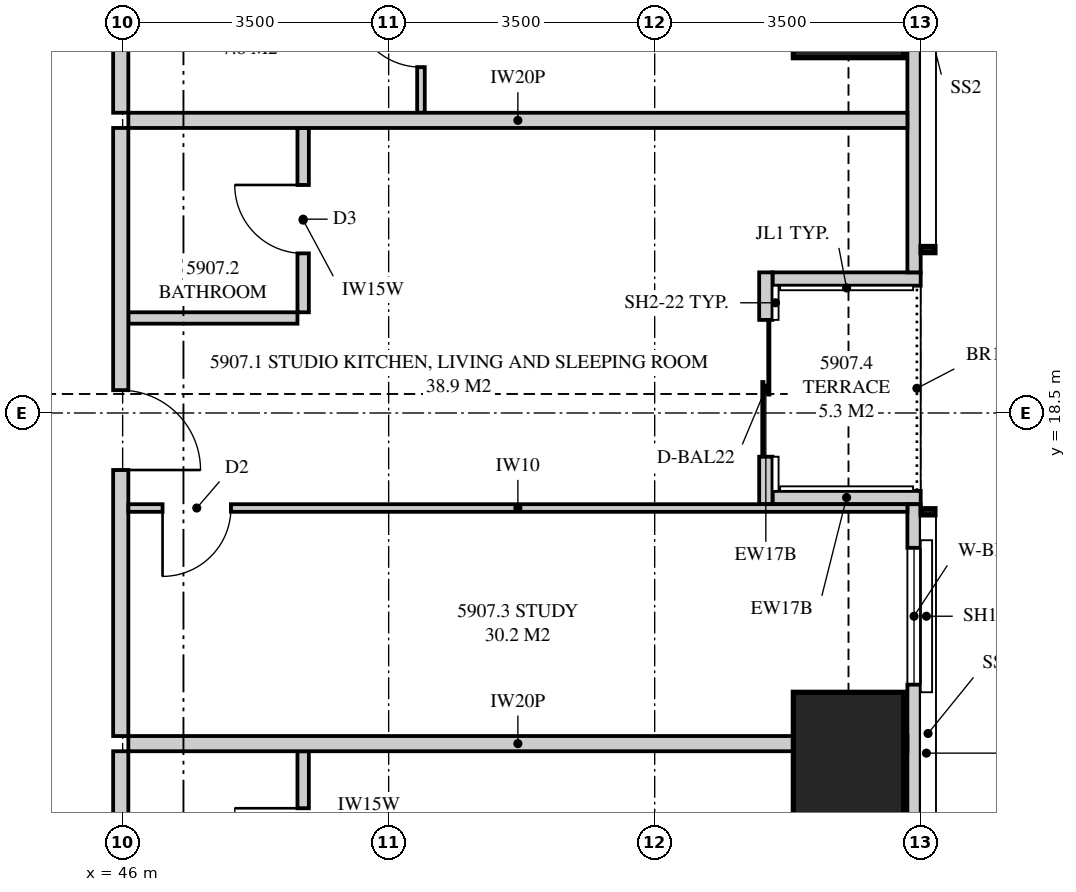
"""IFC4 building model, lengths in metres.
Left out: names, types, materials, properties, quantities, classifications, styles, units other than length and angle.
Written with IfcOpenShell. Run it as: python <this file> out.ifc"""

import sys

from ifc_helpers import new_model, si_unit, direction, frame, frame_2d, origin, origin_2d, place, context, subcontext, project, spatial, polyline, rectangle, outline, extrude, element, fill, save


model = new_model("IFC4")
c1 = context("Model", 3, precision=1e-05, world=origin(), true_north=direction((0.0, 1.0)))
c2 = subcontext(c1, "Body", "Model", "MODEL_VIEW")
j1 = project(units=[si_unit("LENGTHUNIT", "METRE"), si_unit("PLANEANGLEUNIT", "RADIAN")], contexts=[c1])
p1 = place(None, origin())
s1 = spatial("IfcSite", under=j1, at=p1, CompositionType="ELEMENT")
p2 = place(p1, origin())
s2 = spatial("IfcBuilding", under=s1, at=p2, CompositionType="ELEMENT")
p3 = place(p2, frame((0.0, 0.0, 217.95)))
s3 = spatial("IfcBuildingStorey", under=s2, at=p3, CompositionType="ELEMENT", Elevation=217.95)
for number, where, z_axis, x_axis in (
    (1, (55.55, 13.0, 0.0), (0.0, 0.0, 1.0), (1.0, 0.0, 0.0)),
    (2, (55.55, 25.0, 0.0), (0.0, 0.0, 1.0), (1.0, 0.0, 0.0)),
):
    element("IfcColumn", number, at=place(p3, frame(where, z_axis=z_axis, x_axis=x_axis)), inside=s3, PredefinedType="COLUMN", context=c2, shape_type="SweptSolid", body=[
        extrude(rectangle(XDim=1.45, YDim=3.65, at=origin_2d()), origin(), (0.0, 0.0, 1.0), 3.5),
    ])
p4 = place(p3, frame((56.413, 3.051, 0.0), z_axis=(0.0, 0.0, 1.0), x_axis=(0.0, 1.0, 0.0)))
e3 = element("IfcWall", 3, at=p4, inside=s3, PredefinedType="SOLIDWALL", context=c2, shape_type="SweptSolid", body=[
    extrude(outline(polyline([(0.0, 0.0), (14.249, 0.0), (14.249, 2.3), (9.949, 2.3), (9.949, 3.26), (9.858, 3.26), (9.858, 2.3), (9.688, 2.3), (9.688, 3.26), (0.0, 3.26), (0.0, 0.0)])), frame((0.0, 0.087, 0.0), z_axis=(0.0, -1.0, 0.0), x_axis=(1.0, 0.0, 0.0)), (0.0, 0.0, 1.0), 0.175),
])
p5 = place(p4, frame((1.487, 0.0, 0.4)))
e4 = element("IfcOpeningElement", 4, at=p5, cuts=e3, PredefinedType="OPENING", context=c2, shape_type="SweptSolid", body=[
    extrude(rectangle(XDim=1.8, YDim=1.85, at=frame_2d((0.9, 0.925))), frame((0.0, 0.097, 0.0), z_axis=(0.0, -1.0, 0.0), x_axis=(1.0, 0.0, 0.0)), (0.0, 0.0, 1.0), 0.195),
])
p6 = place(p4, frame((5.616, 0.0, 0.4)))
e5 = element("IfcOpeningElement", 5, at=p6, cuts=e3, PredefinedType="OPENING", context=c2, shape_type="SweptSolid", body=[
    extrude(rectangle(XDim=2.4, YDim=1.85, at=frame_2d((1.2, 0.925))), frame((0.0, 0.097, 0.0), z_axis=(0.0, -1.0, 0.0), x_axis=(1.0, 0.0, 0.0)), (0.0, 0.0, 1.0), 0.195),
])
p7 = place(p4, frame((11.875, 0.0, 0.4)))
e6 = element("IfcOpeningElement", 6, at=p7, cuts=e3, PredefinedType="OPENING", context=c2, shape_type="SweptSolid", body=[
    extrude(rectangle(XDim=1.8, YDim=1.85, at=frame_2d((0.9, 0.925))), frame((0.0, 0.097, 0.0), z_axis=(0.0, -1.0, 0.0), x_axis=(1.0, 0.0, 0.0)), (0.0, 0.0, 1.0), 0.195),
])
p8 = place(p3, frame((56.413, 20.35, 0.0), z_axis=(0.0, 0.0, 1.0), x_axis=(0.0, 1.0, 0.0)))
e7 = element("IfcWall", 7, at=p8, inside=s3, PredefinedType="SOLIDWALL", context=c2, shape_type="SweptSolid", body=[
    extrude(outline(polyline([(0.0, 0.0), (10.599, 0.0), (10.599, 3.26), (4.858, 3.26), (4.858, 2.3), (4.793, 2.3), (4.793, 3.26), (4.65, 3.26), (4.65, 2.3), (0.0, 2.3), (0.0, 0.0)])), frame((0.0, 0.087, 0.0), z_axis=(0.0, -1.0, 0.0), x_axis=(1.0, 0.0, 0.0)), (0.0, 0.0, 1.0), 0.175),
])
p9 = place(p8, frame((6.575, 0.0, 0.4)))
e8 = element("IfcOpeningElement", 8, at=p9, cuts=e7, PredefinedType="OPENING", context=c2, shape_type="SweptSolid", body=[
    extrude(rectangle(XDim=1.8, YDim=1.85, at=frame_2d((0.9, 0.925))), frame((0.0, 0.097, 0.0), z_axis=(0.0, -1.0, 0.0), x_axis=(1.0, 0.0, 0.0)), (0.0, 0.0, 1.0), 0.195),
])
p10 = place(p3, frame((54.462, 17.3, 0.0), z_axis=(0.0, 0.0, 1.0), x_axis=(0.0, 1.0, 0.0)))
e9 = element("IfcWall", 9, at=p10, inside=s3, PredefinedType="SOLIDWALL", context=c2, shape_type="SweptSolid", body=[
    extrude(outline(polyline([(0.0, 0.0), (3.05, 0.0), (3.05, 3.26), (2.65, 3.26), (2.65, 2.66), (0.25, 2.66), (0.25, 3.26), (0.0, 3.26), (0.0, 0.0)])), frame((0.0, 0.087, 0.0), z_axis=(0.0, -1.0, 0.0), x_axis=(1.0, 0.0, 0.0)), (0.0, 0.0, 1.0), 0.175),
])
p11 = place(p10, frame((0.625, 0.0, 0.0)))
e10 = element("IfcOpeningElement", 10, at=p11, cuts=e9, PredefinedType="OPENING", context=c2, shape_type="SweptSolid", body=[
    extrude(rectangle(XDim=1.8, YDim=2.25, at=frame_2d((0.9, 1.125))), frame((0.0, 0.097, 0.0), z_axis=(0.0, -1.0, 0.0), x_axis=(1.0, 0.0, 0.0)), (0.0, 0.0, 1.0), 0.195),
])
for number, where, z_axis, x_axis in (
    (11, (56.5, 17.387, 0.0), (0.0, 0.0, 1.0), (-1.0, 0.0, 0.0)),
    (12, (56.5, 20.262, 0.0), (0.0, 0.0, 1.0), (-1.0, 0.0, 0.0)),
):
    element("IfcWall", number, at=place(p3, frame(where, z_axis=z_axis, x_axis=x_axis)), inside=s3, PredefinedType="SOLIDWALL", context=c2, shape_type="SweptSolid", body=[
        extrude(outline(polyline([(0.0, 0.0), (1.95, 0.0), (1.95, 3.26), (1.75, 3.26), (1.75, 2.3), (0.15, 2.3), (0.15, 3.26), (0.0, 3.26), (0.0, 0.0)])), frame((0.0, 0.087, 0.0), z_axis=(0.0, -1.0, 0.0), x_axis=(1.0, 0.0, 0.0)), (0.0, 0.0, 1.0), 0.175),
    ])
p12 = place(p3, frame((56.325, 14.15, 0.0), z_axis=(0.0, 0.0, 1.0), x_axis=(-1.0, 0.0, 0.0)))
e13 = element("IfcWall", 13, at=p12, inside=s3, PredefinedType="PARTITIONING", context=c2, shape_type="SweptSolid", body=[
    extrude(outline(polyline([(0.529, 2.3), (0.0, 2.3), (0.0, 0.0), (0.529, 0.0), (0.529, 0.28), (1.021, 0.28), (1.021, 0.0), (10.25, 0.0), (10.25, 2.66), (1.685, 2.66), (1.685, 2.3), (1.021, 2.3), (1.021, 1.87), (0.529, 1.87), (0.529, 2.3)])), frame((0.0, 0.1, 0.0), z_axis=(0.0, -1.0, 0.0), x_axis=(1.0, 0.0, 0.0)), (0.0, 0.0, 1.0), 0.2),
])
p13 = place(p3, frame((45.975, 8.025, 0.0), z_axis=(0.0, 0.0, 1.0), x_axis=(0.0, 1.0, 0.0)))
e14 = element("IfcWall", 14, at=p13, inside=s3, PredefinedType="PARTITIONING", context=c2, shape_type="SweptSolid", body=[
    extrude(outline(polyline([(0.0, 0.0), (6.025, 0.0), (6.025, 3.26), (6.025, 2.66), (5.085, 2.66), (0.0, 2.66), (0.0, 3.26), (0.0, 0.0)])), frame((0.0, 0.1, 0.0), z_axis=(0.0, -1.0, 0.0), x_axis=(1.0, 0.0, 0.0)), (0.0, 0.0, 1.0), 0.2),
])
p14 = place(p13, frame((2.512, 0.0, 0.0)))
e15 = element("IfcOpeningElement", 15, at=p14, cuts=e14, PredefinedType="OPENING", context=c2, shape_type="SweptSolid", body=[
    extrude(rectangle(XDim=1.05, YDim=2.2, at=frame_2d((0.525, 1.1))), frame((0.0, 0.11, 0.0), z_axis=(0.0, -1.0, 0.0), x_axis=(1.0, 0.0, 0.0)), (0.0, 0.0, 1.0), 0.22),
])
p15 = place(p3, frame((48.375, 11.625, 0.0), z_axis=(0.0, 0.0, 1.0), x_axis=(0.0, 1.0, 0.0)))
e16 = element("IfcWall", 16, at=p15, inside=s3, PredefinedType="PLUMBINGWALL", context=c2, shape_type="SweptSolid", body=[
    extrude(outline(polyline([(0.0, 0.0), (2.425, 0.0), (2.425, 3.26), (2.425, 2.66), (0.09, 2.66), (0.09, 3.26), (0.0, 3.26), (0.0, 0.0)])), frame((0.0, 0.075, 0.0), z_axis=(0.0, -1.0, 0.0), x_axis=(1.0, 0.0, 0.0)), (0.0, 0.0, 1.0), 0.15),
])
p16 = place(p15, frame((0.775, 0.0, 0.0)))
e17 = element("IfcOpeningElement", 17, at=p16, cuts=e16, PredefinedType="OPENING", context=c2, shape_type="SweptSolid", body=[
    extrude(rectangle(XDim=0.9, YDim=2.1, at=frame_2d((0.45, 1.05))), frame((0.0, 0.085, 0.0), z_axis=(0.0, -1.0, 0.0), x_axis=(1.0, 0.0, 0.0)), (0.0, 0.0, 1.0), 0.17),
])
p17 = place(p3, frame((56.325, 22.35, 0.0), z_axis=(0.0, 0.0, 1.0), x_axis=(-1.0, 0.0, 0.0)))
e18 = element("IfcWall", 18, at=p17, inside=s3, PredefinedType="PARTITIONING", context=c2, shape_type="SweptSolid", body=[
    extrude(outline(polyline([(0.0, 0.0), (10.25, 0.0), (10.25, 3.26), (1.685, 3.26), (1.685, 2.3), (0.0, 2.3), (0.0, 3.26), (0.0, 0.0)])), frame((0.0, 0.1, 0.0), z_axis=(0.0, -1.0, 0.0), x_axis=(1.0, 0.0, 0.0)), (0.0, 0.0, 1.0), 0.2),
])
p18 = place(p3, frame((45.975, 14.25, 0.0), z_axis=(0.0, 0.0, 1.0), x_axis=(0.0, 1.0, 0.0)))
e19 = element("IfcWall", 19, at=p18, inside=s3, PredefinedType="PARTITIONING", context=c2, shape_type="SweptSolid", body=[
    extrude(outline(polyline([(0.0, 0.0), (8.0, 0.0), (8.0, 3.26), (5.81, 3.26), (5.81, 2.66), (3.19, 2.66), (3.19, 3.26), (0.06, 3.26), (0.06, 2.66), (0.0, 2.66), (0.0, 3.26), (0.0, 0.0)])), frame((0.0, 0.1, 0.0), z_axis=(0.0, -1.0, 0.0), x_axis=(1.0, 0.0, 0.0)), (0.0, 0.0, 1.0), 0.2),
])
p19 = place(p18, frame((3.5, 0.0, 0.0)))
e20 = element("IfcOpeningElement", 20, at=p19, cuts=e19, PredefinedType="OPENING", context=c2, shape_type="SweptSolid", body=[
    extrude(rectangle(XDim=1.05, YDim=2.2, at=frame_2d((0.525, 1.1))), frame((0.0, 0.11, 0.0), z_axis=(0.0, -1.0, 0.0), x_axis=(1.0, 0.0, 0.0)), (0.0, 0.0, 1.0), 0.22),
])
p20 = place(p3, frame((48.375, 19.825, 0.0), z_axis=(0.0, 0.0, 1.0), x_axis=(0.0, 1.0, 0.0)))
e21 = element("IfcWall", 21, at=p20, inside=s3, PredefinedType="PLUMBINGWALL", context=c2, shape_type="SweptSolid", body=[
    extrude(outline(polyline([(0.0, 0.0), (2.425, 0.0), (2.425, 3.26), (0.21, 3.26), (0.21, 2.66), (0.0, 2.66), (0.0, 3.26), (0.0, 0.0)])), frame((0.0, 0.075, 0.0), z_axis=(0.0, -1.0, 0.0), x_axis=(1.0, 0.0, 0.0)), (0.0, 0.0, 1.0), 0.15),
])
p21 = place(p20, frame((0.775, 0.0, 0.0)))
e22 = element("IfcOpeningElement", 22, at=p21, cuts=e21, PredefinedType="OPENING", context=c2, shape_type="SweptSolid", body=[
    extrude(rectangle(XDim=0.9, YDim=2.1, at=frame_2d((0.45, 1.05))), frame((0.0, 0.085, 0.0), z_axis=(0.0, -1.0, 0.0), x_axis=(1.0, 0.0, 0.0)), (0.0, 0.0, 1.0), 0.17),
])
p22 = place(p3, frame((48.3, 19.75, 0.0), z_axis=(0.0, 0.0, 1.0), x_axis=(-1.0, 0.0, 0.0)))
e23 = element("IfcWall", 23, at=p22, inside=s3, PredefinedType="PLUMBINGWALL", context=c2, shape_type="SweptSolid", body=[
    extrude(outline(polyline([(0.0, 0.0), (2.225, 0.0), (2.225, 3.26), (2.225, 2.66), (0.0, 2.66), (0.0, 3.26), (0.0, 0.0)])), frame((0.0, 0.075, 0.0), z_axis=(0.0, -1.0, 0.0), x_axis=(1.0, 0.0, 0.0)), (0.0, 0.0, 1.0), 0.15),
])
p23 = place(p3, frame((56.325, 17.25, 0.0), z_axis=(0.0, 0.0, 1.0), x_axis=(-1.0, 0.0, 0.0)))
e24 = element("IfcWall", 24, at=p23, inside=s3, PredefinedType="PARTITIONING", context=c2, shape_type="SweptSolid", body=[
    extrude(outline(polyline([(0.0, 0.0), (10.25, 0.0), (10.25, 3.26), (1.635, 3.26), (1.635, 2.3), (0.0, 2.3), (0.0, 3.26), (0.0, 0.0)])), frame((0.0, 0.05, 0.0), z_axis=(0.0, -1.0, 0.0), x_axis=(1.0, 0.0, 0.0)), (0.0, 0.0, 1.0), 0.1),
])
p24 = place(p23, frame((8.9, 0.0, 0.0)))
e25 = element("IfcOpeningElement", 25, at=p24, cuts=e24, PredefinedType="OPENING", context=c2, shape_type="SweptSolid", body=[
    extrude(rectangle(XDim=0.9, YDim=2.1, at=frame_2d((0.45, 1.05))), frame((0.0, 0.06, 0.0), z_axis=(0.0, -1.0, 0.0), x_axis=(1.0, 0.0, 0.0)), (0.0, 0.0, 1.0), 0.12),
])
p25 = place(p3, frame((45.975, 22.45, 0.0), z_axis=(0.0, 0.0, 1.0), x_axis=(0.0, 1.0, 0.0)))
e26 = element("IfcWall", 26, at=p25, inside=s3, PredefinedType="PARTITIONING", context=c2, shape_type="SweptSolid", body=[
    extrude(outline(polyline([(0.0, 0.0), (2.55, 0.0), (2.55, 2.66), (1.24, 2.66), (1.24, 3.26), (0.0, 3.26), (0.0, 0.0)])), frame((0.0, 0.1, 0.0), z_axis=(0.0, -1.0, 0.0), x_axis=(1.0, 0.0, 0.0)), (0.0, 0.0, 1.0), 0.2),
])
p26 = place(p3, frame((49.925, 22.45, 0.0), z_axis=(0.0, 0.0, 1.0), x_axis=(0.0, 1.0, 0.0)))
e27 = element("IfcWall", 27, at=p26, inside=s3, PredefinedType="PARTITIONING", context=c2, shape_type="SweptSolid", body=[
    extrude(outline(polyline([(0.0, 0.0), (2.1, 0.0), (2.1, 3.26), (2.1, 2.66), (1.29, 2.66), (1.29, 3.26), (0.0, 3.26), (0.0, 0.0)])), frame((0.0, 0.05, 0.0), z_axis=(0.0, -1.0, 0.0), x_axis=(1.0, 0.0, 0.0)), (0.0, 0.0, 1.0), 0.1),
])
p27 = place(p26, frame((0.6, 0.0, 0.0)))
e28 = element("IfcOpeningElement", 28, at=p27, cuts=e27, PredefinedType="OPENING", context=c2, shape_type="SweptSolid", body=[
    extrude(rectangle(XDim=0.9, YDim=2.1, at=frame_2d((0.45, 1.05))), frame((0.0, 0.06, 0.0), z_axis=(0.0, -1.0, 0.0), x_axis=(1.0, 0.0, 0.0)), (0.0, 0.0, 1.0), 0.12),
])
p28 = place(p7, origin())
e29 = element("IfcWindow", 29, at=p28, inside=s3, PartitioningType="SINGLE_PANEL", PredefinedType="WINDOW", context=c2, shape_type="SweptSolid", body=[
    extrude(rectangle(XDim=1.8, YDim=1.85, at=frame_2d((0.9, 0.925))), frame((0.0, 0.03, 0.0), z_axis=(0.0, -1.0, 0.0), x_axis=(1.0, 0.0, 0.0)), (0.0, 0.0, 1.0), 0.06),
])
fill(e6, e29)
p29 = place(p11, origin())
e30 = element("IfcDoor", 30, at=p29, inside=s3, OperationType="SLIDING_TO_LEFT", PredefinedType="DOOR", context=c2, shape_type="SweptSolid", body=[
    extrude(rectangle(XDim=1.8, YDim=2.25, at=frame_2d((0.9, 1.125))), frame((0.0, 0.025, 0.0), z_axis=(0.0, -1.0, 0.0), x_axis=(1.0, 0.0, 0.0)), (0.0, 0.0, 1.0), 0.05),
])
fill(e10, e30)
p30 = place(p16, origin())
e31 = element("IfcDoor", 31, at=p30, inside=s3, OperationType="SINGLE_SWING_RIGHT", PredefinedType="DOOR", context=c2, shape_type="SweptSolid", body=[
    extrude(rectangle(XDim=0.9, YDim=2.1, at=frame_2d((0.45, 1.05))), frame((0.0, 0.025, 0.0), z_axis=(0.0, -1.0, 0.0), x_axis=(1.0, 0.0, 0.0)), (0.0, 0.0, 1.0), 0.05),
])
fill(e17, e31)
p31 = place(p19, frame((1.05, 0.0, 0.0), z_axis=(0.0, 0.0, 1.0), x_axis=(-1.0, 0.0, 0.0)))
e32 = element("IfcDoor", 32, at=p31, inside=s3, OperationType="SINGLE_SWING_RIGHT", PredefinedType="DOOR", context=c2, shape_type="SweptSolid", body=[
    extrude(rectangle(XDim=1.05, YDim=2.2, at=frame_2d((0.525, 1.1))), frame((0.0, 0.025, 0.0), z_axis=(0.0, -1.0, 0.0), x_axis=(1.0, 0.0, 0.0)), (0.0, 0.0, 1.0), 0.05),
])
fill(e20, e32)
p32 = place(p21, origin())
e33 = element("IfcDoor", 33, at=p32, inside=s3, OperationType="SINGLE_SWING_RIGHT", PredefinedType="DOOR", context=c2, shape_type="SweptSolid", body=[
    extrude(rectangle(XDim=0.9, YDim=2.1, at=frame_2d((0.45, 1.05))), frame((0.0, 0.025, 0.0), z_axis=(0.0, -1.0, 0.0), x_axis=(1.0, 0.0, 0.0)), (0.0, 0.0, 1.0), 0.05),
])
fill(e22, e33)
p33 = place(p24, origin())
e34 = element("IfcDoor", 34, at=p33, inside=s3, OperationType="SINGLE_SWING_RIGHT", PredefinedType="DOOR", context=c2, shape_type="SweptSolid", body=[
    extrude(rectangle(XDim=0.9, YDim=2.1, at=frame_2d((0.45, 1.05))), frame((0.0, 0.025, 0.0), z_axis=(0.0, -1.0, 0.0), x_axis=(1.0, 0.0, 0.0)), (0.0, 0.0, 1.0), 0.05),
])
fill(e25, e34)
p34 = place(p27, origin())
e35 = element("IfcDoor", 35, at=p34, inside=s3, OperationType="SINGLE_SWING_RIGHT", PredefinedType="DOOR", context=c2, shape_type="SweptSolid", body=[
    extrude(rectangle(XDim=0.9, YDim=2.1, at=frame_2d((0.45, 1.05))), frame((0.0, 0.025, 0.0), z_axis=(0.0, -1.0, 0.0), x_axis=(1.0, 0.0, 0.0)), (0.0, 0.0, 1.0), 0.05),
])
fill(e28, e35)
save(model, sys.argv[1])
